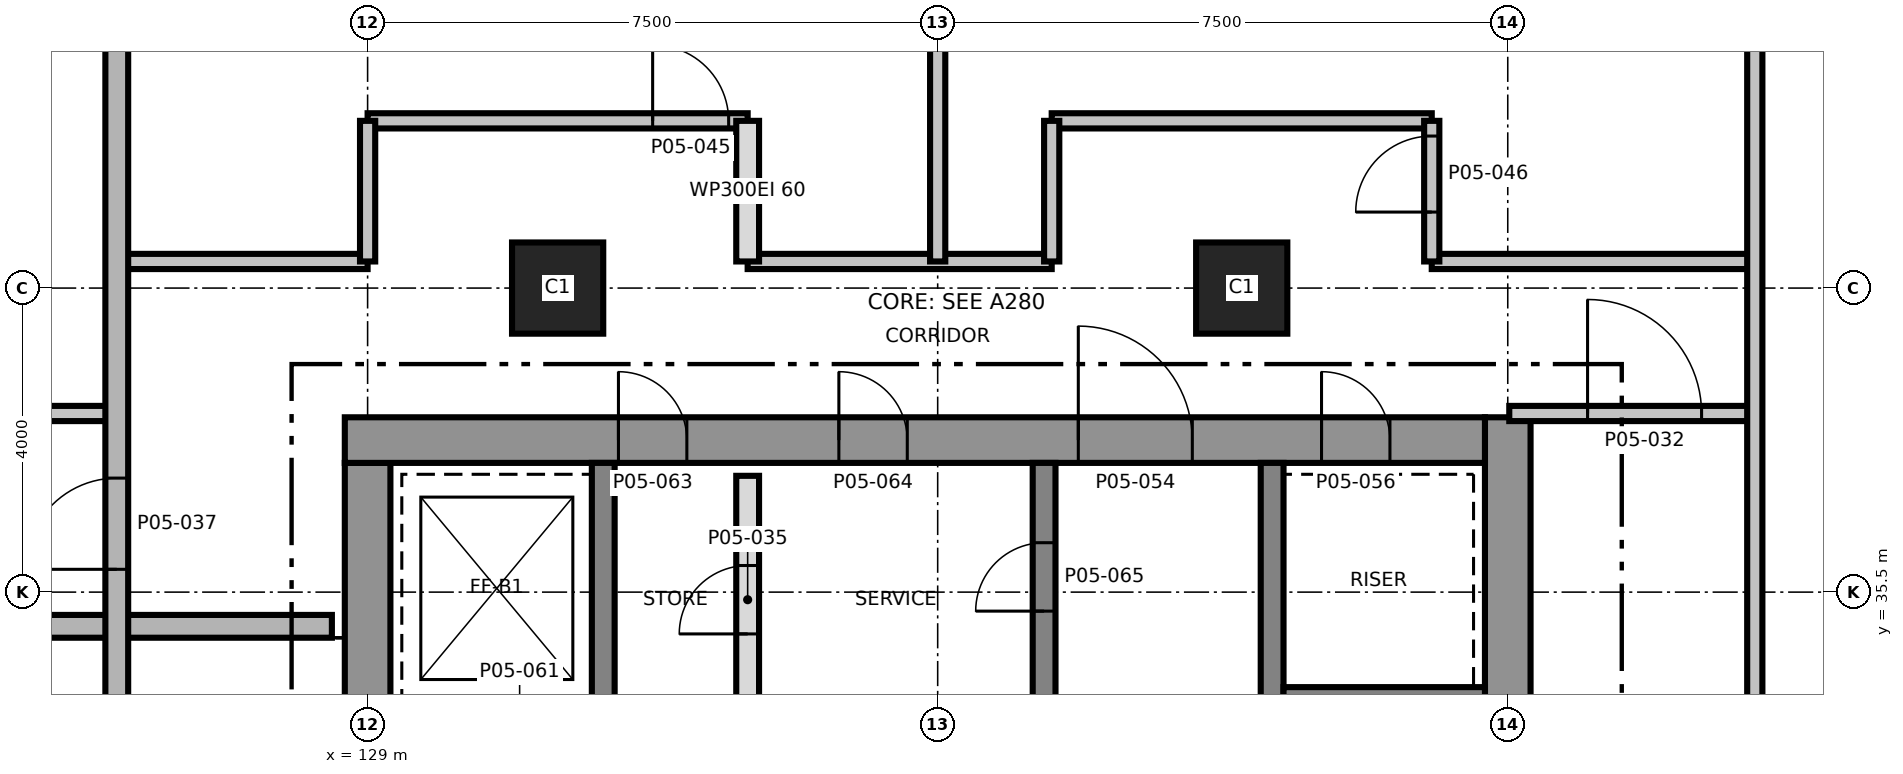
"""IFC4 building model, lengths in metres.
Left out: names, types, materials, properties, quantities, classifications, styles, units other than length and angle.
Written with IfcOpenShell. Run it as: python <this file> out.ifc"""

import sys

from ifc_helpers import new_model, si_unit, direction, frame, frame_2d, origin, origin_2d, place, context, subcontext, project, spatial, rectangle, extrude, element, fill, save


model = new_model("IFC4")
c1 = context("Model", 3, precision=1e-05, world=origin(), true_north=direction((0.0, 1.0)))
c2 = subcontext(c1, "Body", "Model", "MODEL_VIEW")
j1 = project(units=[si_unit("LENGTHUNIT", "METRE"), si_unit("PLANEANGLEUNIT", "RADIAN")], contexts=[c1])
p1 = place(None, origin())
s1 = spatial("IfcSite", under=j1, at=p1, CompositionType="ELEMENT")
p2 = place(p1, origin())
s2 = spatial("IfcBuilding", under=s1, at=p2, CompositionType="ELEMENT")
p3 = place(p2, frame((0.0, 0.0, 28.5)))
s3 = spatial("IfcBuildingStorey", under=s2, at=p3, CompositionType="ELEMENT", Elevation=28.5)
p4 = place(p3, frame((129.0, 24.8, 0.0), z_axis=(0.0, 0.0, 1.0), x_axis=(0.0, 1.0, 0.0)))
e1 = element("IfcWall", 1, at=p4, inside=s3, PredefinedType="SHEAR", context=c2, shape_type="SweptSolid", body=[
    extrude(rectangle(XDim=12.4, YDim=0.6, at=frame_2d((6.2, 0.0))), origin(), (0.0, 0.0, 1.0), 5.0),
])
p5 = place(p4, frame((5.15, 0.0, 0.0)))
e2 = element("IfcOpeningElement", 2, at=p5, cuts=e1, PredefinedType="OPENING", context=c2, shape_type="SweptSolid", body=[
    extrude(rectangle(XDim=1.0, YDim=2.1, at=frame_2d((0.5, 1.05))), frame((0.0, 0.31, 0.0), z_axis=(0.0, -1.0, 0.0), x_axis=(1.0, 0.0, 0.0)), (0.0, 0.0, 1.0), 0.62),
])
p6 = place(p3, frame((144.0, 24.2, 0.0), z_axis=(0.0, 0.0, 1.0), x_axis=(0.0, 1.0, 0.0)))
e3 = element("IfcWall", 3, at=p6, inside=s3, PredefinedType="SHEAR", context=c2, shape_type="SweptSolid", body=[
    extrude(rectangle(XDim=13.6, YDim=0.6, at=frame_2d((6.8, 0.0))), origin(), (0.0, 0.0, 1.0), 5.0),
])
p7 = place(p3, frame((128.7, 37.5, 0.0), z_axis=(0.0, 0.0, 1.0), x_axis=(1.0, 0.0, 0.0)))
e4 = element("IfcWall", 4, at=p7, inside=s3, PredefinedType="SHEAR", context=c2, shape_type="SweptSolid", body=[
    extrude(rectangle(XDim=15.0, YDim=0.6, at=frame_2d((7.5, 0.0))), origin(), (0.0, 0.0, 1.0), 5.0),
])
p8 = place(p7, frame((9.65, 0.0, 0.0)))
e5 = element("IfcOpeningElement", 5, at=p8, cuts=e4, PredefinedType="OPENING", context=c2, shape_type="SweptSolid", body=[
    extrude(rectangle(XDim=1.5, YDim=2.1, at=frame_2d((0.75, 1.05))), frame((0.0, 0.31, 0.0), z_axis=(0.0, -1.0, 0.0), x_axis=(1.0, 0.0, 0.0)), (0.0, 0.0, 1.0), 0.62),
])
p9 = place(p7, frame((12.85, 0.0, 0.0)))
e6 = element("IfcOpeningElement", 6, at=p9, cuts=e4, PredefinedType="OPENING", context=c2, shape_type="SweptSolid", body=[
    extrude(rectangle(XDim=0.9, YDim=2.1, at=frame_2d((0.45, 1.05))), frame((0.0, 0.31, 0.0), z_axis=(0.0, -1.0, 0.0), x_axis=(1.0, 0.0, 0.0)), (0.0, 0.0, 1.0), 0.62),
])
p10 = place(p7, frame((3.6, 0.0, 0.0)))
e7 = element("IfcOpeningElement", 7, at=p10, cuts=e4, PredefinedType="OPENING", context=c2, shape_type="SweptSolid", body=[
    extrude(rectangle(XDim=0.9, YDim=2.1, at=frame_2d((0.45, 1.05))), frame((0.0, 0.31, 0.0), z_axis=(0.0, -1.0, 0.0), x_axis=(1.0, 0.0, 0.0)), (0.0, 0.0, 1.0), 0.62),
])
p11 = place(p7, frame((6.5, 0.0, 0.0)))
e8 = element("IfcOpeningElement", 8, at=p11, cuts=e4, PredefinedType="OPENING", context=c2, shape_type="SweptSolid", body=[
    extrude(rectangle(XDim=0.9, YDim=2.1, at=frame_2d((0.45, 1.05))), frame((0.0, 0.31, 0.0), z_axis=(0.0, -1.0, 0.0), x_axis=(1.0, 0.0, 0.0)), (0.0, 0.0, 1.0), 0.62),
])
p12 = place(p3, frame((132.1, 24.8, 0.0), z_axis=(0.0, 0.0, 1.0), x_axis=(0.0, 1.0, 0.0)))
e9 = element("IfcWall", 9, at=p12, inside=s3, PredefinedType="SHEAR", context=c2, shape_type="SweptSolid", body=[
    extrude(rectangle(XDim=12.4, YDim=0.3, at=frame_2d((6.2, 0.0))), origin(), (0.0, 0.0, 1.0), 5.0),
])
p13 = place(p12, frame((3.9, 0.0, 0.0)))
e10 = element("IfcOpeningElement", 10, at=p13, cuts=e9, PredefinedType="OPENING", context=c2, shape_type="SweptSolid", body=[
    extrude(rectangle(XDim=1.2, YDim=2.1, at=frame_2d((0.6, 1.05))), frame((0.0, 0.16, 0.0), z_axis=(0.0, -1.0, 0.0), x_axis=(1.0, 0.0, 0.0)), (0.0, 0.0, 1.0), 0.32),
])
p14 = place(p3, frame((137.9, 24.8, 0.0), z_axis=(0.0, 0.0, 1.0), x_axis=(0.0, 1.0, 0.0)))
e11 = element("IfcWall", 11, at=p14, inside=s3, PredefinedType="SHEAR", context=c2, shape_type="SweptSolid", body=[
    extrude(rectangle(XDim=12.4, YDim=0.3, at=frame_2d((6.2, 0.0))), origin(), (0.0, 0.0, 1.0), 5.0),
])
p15 = place(p14, frame((3.95, 0.0, 0.0)))
e12 = element("IfcOpeningElement", 12, at=p15, cuts=e11, PredefinedType="OPENING", context=c2, shape_type="SweptSolid", body=[
    extrude(rectangle(XDim=1.5, YDim=2.1, at=frame_2d((0.75, 1.05))), frame((0.0, 0.16, 0.0), z_axis=(0.0, -1.0, 0.0), x_axis=(1.0, 0.0, 0.0)), (0.0, 0.0, 1.0), 0.32),
])
p16 = place(p14, frame((10.45, 0.0, 0.0)))
e13 = element("IfcOpeningElement", 13, at=p16, cuts=e11, PredefinedType="OPENING", context=c2, shape_type="SweptSolid", body=[
    extrude(rectangle(XDim=0.9, YDim=2.1, at=frame_2d((0.45, 1.05))), frame((0.0, 0.16, 0.0), z_axis=(0.0, -1.0, 0.0), x_axis=(1.0, 0.0, 0.0)), (0.0, 0.0, 1.0), 0.32),
])
p17 = place(p3, frame((140.9, 24.8, 0.0), z_axis=(0.0, 0.0, 1.0), x_axis=(0.0, 1.0, 0.0)))
e14 = element("IfcWall", 14, at=p17, inside=s3, PredefinedType="SHEAR", context=c2, shape_type="SweptSolid", body=[
    extrude(rectangle(XDim=12.4, YDim=0.3, at=frame_2d((6.2, 0.0))), origin(), (0.0, 0.0, 1.0), 5.0),
])
p18 = place(p17, frame((5.9, 0.0, 0.0)))
e15 = element("IfcOpeningElement", 15, at=p18, cuts=e14, PredefinedType="OPENING", context=c2, shape_type="SweptSolid", body=[
    extrude(rectangle(XDim=1.2, YDim=2.1, at=frame_2d((0.6, 1.05))), frame((0.0, 0.16, 0.0), z_axis=(0.0, -1.0, 0.0), x_axis=(1.0, 0.0, 0.0)), (0.0, 0.0, 1.0), 0.32),
])
p19 = place(p3, frame((141.05, 34.1, 0.0), z_axis=(0.0, 0.0, 1.0), x_axis=(1.0, 0.0, 0.0)))
e16 = element("IfcWall", 16, at=p19, inside=s3, PredefinedType="SHEAR", context=c2, shape_type="SweptSolid", body=[
    extrude(rectangle(XDim=2.65, YDim=0.3, at=frame_2d((1.325, 0.0))), origin(), (0.0, 0.0, 1.0), 5.0),
])
for number, where, z_axis, x_axis in (
    (17, (131.5, 39.5, 0.0), (0.0, 0.0, 1.0), (1.0, 0.0, 0.0)),
    (18, (140.5, 39.5, 0.0), (0.0, 0.0, 1.0), (1.0, 0.0, 0.0)),
):
    element("IfcColumn", number, at=place(p3, frame(where, z_axis=z_axis, x_axis=x_axis)), inside=s3, PredefinedType="COLUMN", context=c2, shape_type="SweptSolid", body=[
        extrude(rectangle(XDim=1.2, YDim=1.2, at=origin_2d()), origin(), (0.0, 0.0, 1.0), 5.0),
    ])
p20 = place(p3, frame((114.6, 35.05, 0.0), z_axis=(0.0, 0.0, 1.0), x_axis=(1.0, 0.0, 0.0)))
e19 = element("IfcWall", 19, at=p20, inside=s3, PredefinedType="SHEAR", context=c2, shape_type="SweptSolid", body=[
    extrude(rectangle(XDim=13.93, YDim=0.3, at=frame_2d((6.965, 0.0))), origin(), (0.0, 0.0, 1.0), 4.65),
])
p21 = place(p20, frame((5.13, 0.0, 0.0)))
e20 = element("IfcOpeningElement", 20, at=p21, cuts=e19, PredefinedType="OPENING", context=c2, shape_type="SweptSolid", body=[
    extrude(rectangle(XDim=1.0, YDim=2.1, at=frame_2d((0.5, 1.05))), frame((0.0, 0.16, 0.0), z_axis=(0.0, -1.0, 0.0), x_axis=(1.0, 0.0, 0.0)), (0.0, 0.0, 1.0), 0.32),
])
p22 = place(p3, frame((114.6, 37.85, 0.0), z_axis=(0.0, 0.0, 1.0), x_axis=(1.0, 0.0, 0.0)))
e21 = element("IfcWall", 21, at=p22, inside=s3, PredefinedType="PARTITIONING", context=c2, shape_type="SweptSolid", body=[
    extrude(rectangle(XDim=11.15, YDim=0.2, at=frame_2d((5.575, 0.0))), origin(), (0.0, 0.0, 1.0), 3.8),
])
p23 = place(p22, frame((5.005, 0.0, 0.0)))
e22 = element("IfcOpeningElement", 22, at=p23, cuts=e21, PredefinedType="OPENING", context=c2, shape_type="SweptSolid", body=[
    extrude(rectangle(XDim=1.0, YDim=2.1, at=frame_2d((0.5, 1.05))), frame((0.0, 0.11, 0.0), z_axis=(0.0, -1.0, 0.0), x_axis=(1.0, 0.0, 0.0)), (0.0, 0.0, 1.0), 0.22),
])
p24 = place(p3, frame((144.02, 37.85, 0.0), z_axis=(0.0, 0.0, 1.0), x_axis=(1.0, 0.0, 0.0)))
e23 = element("IfcWall", 23, at=p24, inside=s3, PredefinedType="PARTITIONING", context=c2, shape_type="SweptSolid", body=[
    extrude(rectangle(XDim=3.23, YDim=0.2, at=frame_2d((1.615, 0.0))), origin(), (0.0, 0.0, 1.0), 3.8),
])
p25 = place(p24, frame((1.03, 0.0, 0.0)))
e24 = element("IfcOpeningElement", 24, at=p25, cuts=e23, PredefinedType="OPENING", context=c2, shape_type="SweptSolid", body=[
    extrude(rectangle(XDim=1.5, YDim=2.1, at=frame_2d((0.75, 1.05))), frame((0.0, 0.11, 0.0), z_axis=(0.0, -1.0, 0.0), x_axis=(1.0, 0.0, 0.0)), (0.0, 0.0, 1.0), 0.22),
])
p26 = place(p3, frame((125.75, 39.85, 0.0), z_axis=(0.0, 0.0, 1.0), x_axis=(1.0, 0.0, 0.0)))
e25 = element("IfcWall", 25, at=p26, inside=s3, PredefinedType="PARTITIONING", context=c2, shape_type="SweptSolid", body=[
    extrude(rectangle(XDim=3.25, YDim=0.2, at=frame_2d((1.625, 0.0))), origin(), (0.0, 0.0, 1.0), 3.8),
])
p27 = place(p3, frame((134.0, 39.85, 0.0), z_axis=(0.0, 0.0, 1.0), x_axis=(1.0, 0.0, 0.0)))
e26 = element("IfcWall", 26, at=p27, inside=s3, PredefinedType="PARTITIONING", context=c2, shape_type="SweptSolid", body=[
    extrude(rectangle(XDim=4.0, YDim=0.2, at=frame_2d((2.0, 0.0))), origin(), (0.0, 0.0, 1.0), 3.8),
])
p28 = place(p3, frame((143.0, 39.85, 0.0), z_axis=(0.0, 0.0, 1.0), x_axis=(1.0, 0.0, 0.0)))
e27 = element("IfcWall", 27, at=p28, inside=s3, PredefinedType="PARTITIONING", context=c2, shape_type="SweptSolid", body=[
    extrude(rectangle(XDim=4.25, YDim=0.2, at=frame_2d((2.125, 0.0))), origin(), (0.0, 0.0, 1.0), 3.8),
])
p29 = place(p3, frame((129.0, 41.7, 0.0), z_axis=(0.0, 0.0, 1.0), x_axis=(1.0, 0.0, 0.0)))
e28 = element("IfcWall", 28, at=p29, inside=s3, PredefinedType="PARTITIONING", context=c2, shape_type="SweptSolid", body=[
    extrude(rectangle(XDim=5.0, YDim=0.2, at=frame_2d((2.5, 0.0))), origin(), (0.0, 0.0, 1.0), 3.8),
])
p30 = place(p29, frame((3.75, 0.0, 0.0)))
e29 = element("IfcOpeningElement", 29, at=p30, cuts=e28, PredefinedType="OPENING", context=c2, shape_type="SweptSolid", body=[
    extrude(rectangle(XDim=1.0, YDim=2.1, at=frame_2d((0.5, 1.05))), frame((0.0, 0.11, 0.0), z_axis=(0.0, -1.0, 0.0), x_axis=(1.0, 0.0, 0.0)), (0.0, 0.0, 1.0), 0.22),
])
p31 = place(p3, frame((138.0, 41.7, 0.0), z_axis=(0.0, 0.0, 1.0), x_axis=(1.0, 0.0, 0.0)))
e30 = element("IfcWall", 30, at=p31, inside=s3, PredefinedType="PARTITIONING", context=c2, shape_type="SweptSolid", body=[
    extrude(rectangle(XDim=5.0, YDim=0.2, at=frame_2d((2.5, 0.0))), origin(), (0.0, 0.0, 1.0), 3.8),
])
p32 = place(p3, frame((125.7, 11.07, 0.0), z_axis=(0.0, 0.0, 1.0), x_axis=(0.0, 1.0, 0.0)))
e31 = element("IfcWall", 31, at=p32, inside=s3, PredefinedType="SHEAR", context=c2, shape_type="SweptSolid", body=[
    extrude(rectangle(XDim=38.86, YDim=0.3, at=frame_2d((19.43, 0.0))), origin(), (0.0, 0.0, 1.0), 4.65),
])
p33 = place(p32, frame((24.73, 0.0, 0.0)))
e32 = element("IfcOpeningElement", 32, at=p33, cuts=e31, PredefinedType="OPENING", context=c2, shape_type="SweptSolid", body=[
    extrude(rectangle(XDim=1.2, YDim=2.1, at=frame_2d((0.6, 1.05))), frame((0.0, 0.16, 0.0), z_axis=(0.0, -1.0, 0.0), x_axis=(1.0, 0.0, 0.0)), (0.0, 0.0, 1.0), 0.32),
])
p34 = place(p3, frame((129.0, 39.85, 0.0), z_axis=(0.0, 0.0, 1.0), x_axis=(0.0, 1.0, 0.0)))
e33 = element("IfcWall", 33, at=p34, inside=s3, PredefinedType="PARTITIONING", context=c2, shape_type="SweptSolid", body=[
    extrude(rectangle(XDim=1.85, YDim=0.2, at=frame_2d((0.925, 0.0))), origin(), (0.0, 0.0, 1.0), 3.8),
])
p35 = place(p3, frame((134.0, 33.77, 0.0), z_axis=(0.0, 0.0, 1.0), x_axis=(0.0, 1.0, 0.0)))
e34 = element("IfcWall", 34, at=p35, inside=s3, PredefinedType="PARTITIONING", context=c2, shape_type="SweptSolid", body=[
    extrude(rectangle(XDim=3.26, YDim=0.3, at=frame_2d((1.63, 0.0))), origin(), (0.0, 0.0, 1.0), 3.8),
])
p36 = place(p35, frame((1.18, 0.0, 0.0)))
e35 = element("IfcOpeningElement", 35, at=p36, cuts=e34, PredefinedType="OPENING", context=c2, shape_type="SweptSolid", body=[
    extrude(rectangle(XDim=0.9, YDim=2.1, at=frame_2d((0.45, 1.05))), frame((0.0, 0.16, 0.0), z_axis=(0.0, -1.0, 0.0), x_axis=(1.0, 0.0, 0.0)), (0.0, 0.0, 1.0), 0.32),
])
p37 = place(p3, frame((134.0, 39.85, 0.0), z_axis=(0.0, 0.0, 1.0), x_axis=(0.0, 1.0, 0.0)))
e36 = element("IfcWall", 36, at=p37, inside=s3, PredefinedType="PARTITIONING", context=c2, shape_type="SweptSolid", body=[
    extrude(rectangle(XDim=1.85, YDim=0.3, at=frame_2d((0.925, 0.0))), origin(), (0.0, 0.0, 1.0), 3.8),
])
p38 = place(p3, frame((136.5, 39.85, 0.0), z_axis=(0.0, 0.0, 1.0), x_axis=(0.0, 1.0, 0.0)))
e37 = element("IfcWall", 37, at=p38, inside=s3, PredefinedType="PARTITIONING", context=c2, shape_type="SweptSolid", body=[
    extrude(rectangle(XDim=10.08, YDim=0.2, at=frame_2d((5.04, 0.0))), origin(), (0.0, 0.0, 1.0), 3.8),
])
p39 = place(p3, frame((138.0, 39.85, 0.0), z_axis=(0.0, 0.0, 1.0), x_axis=(0.0, 1.0, 0.0)))
e38 = element("IfcWall", 38, at=p39, inside=s3, PredefinedType="PARTITIONING", context=c2, shape_type="SweptSolid", body=[
    extrude(rectangle(XDim=1.85, YDim=0.2, at=frame_2d((0.925, 0.0))), origin(), (0.0, 0.0, 1.0), 3.8),
])
p40 = place(p3, frame((143.0, 39.85, 0.0), z_axis=(0.0, 0.0, 1.0), x_axis=(0.0, 1.0, 0.0)))
e39 = element("IfcWall", 39, at=p40, inside=s3, PredefinedType="PARTITIONING", context=c2, shape_type="SweptSolid", body=[
    extrude(rectangle(XDim=1.85, YDim=0.2, at=frame_2d((0.925, 0.0))), origin(), (0.0, 0.0, 1.0), 3.8),
])
p41 = place(p40, frame((0.65, 0.0, 0.0)))
e40 = element("IfcOpeningElement", 40, at=p41, cuts=e39, PredefinedType="OPENING", context=c2, shape_type="SweptSolid", body=[
    extrude(rectangle(XDim=1.0, YDim=2.1, at=frame_2d((0.5, 1.05))), frame((0.0, 0.11, 0.0), z_axis=(0.0, -1.0, 0.0), x_axis=(1.0, 0.0, 0.0)), (0.0, 0.0, 1.0), 0.22),
])
p42 = place(p3, frame((147.25, 11.07, 0.0), z_axis=(0.0, 0.0, 1.0), x_axis=(0.0, 1.0, 0.0)))
e41 = element("IfcWall", 41, at=p42, inside=s3, PredefinedType="PARTITIONING", context=c2, shape_type="SweptSolid", body=[
    extrude(rectangle(XDim=38.86, YDim=0.2, at=frame_2d((19.43, 0.0))), origin(), (0.0, 0.0, 1.0), 3.8),
])
p43 = place(p42, frame((18.18, 0.0, 0.0)))
e42 = element("IfcOpeningElement", 42, at=p43, cuts=e41, PredefinedType="OPENING", context=c2, shape_type="SweptSolid", body=[
    extrude(rectangle(XDim=1.5, YDim=2.1, at=frame_2d((0.75, 1.05))), frame((0.0, 0.11, 0.0), z_axis=(0.0, -1.0, 0.0), x_axis=(1.0, 0.0, 0.0)), (0.0, 0.0, 1.0), 0.22),
])
p44 = place(p42, frame((4.975, 0.0, 0.0)))
e43 = element("IfcOpeningElement", 43, at=p44, cuts=e41, PredefinedType="OPENING", context=c2, shape_type="SweptSolid", body=[
    extrude(rectangle(XDim=1.0, YDim=2.1, at=frame_2d((0.5, 1.05))), frame((0.0, 0.11, 0.0), z_axis=(0.0, -1.0, 0.0), x_axis=(1.0, 0.0, 0.0)), (0.0, 0.0, 1.0), 0.22),
])
p45 = place(p25, origin())
e44 = element("IfcDoor", 44, at=p45, inside=s3, OperationType="SINGLE_SWING_RIGHT", PredefinedType="DOOR", context=c2, shape_type="SweptSolid", body=[
    extrude(rectangle(XDim=1.5, YDim=2.1, at=frame_2d((0.75, 1.05))), frame((0.0, 0.025, 0.0), z_axis=(0.0, -1.0, 0.0), x_axis=(1.0, 0.0, 0.0)), (0.0, 0.0, 1.0), 0.05),
])
fill(e24, e44)
p46 = place(p36, origin())
e45 = element("IfcDoor", 45, at=p46, inside=s3, OperationType="SINGLE_SWING_LEFT", PredefinedType="DOOR", context=c2, shape_type="SweptSolid", body=[
    extrude(rectangle(XDim=0.9, YDim=2.1, at=frame_2d((0.45, 1.05))), frame((0.0, 0.025, 0.0), z_axis=(0.0, -1.0, 0.0), x_axis=(1.0, 0.0, 0.0)), (0.0, 0.0, 1.0), 0.05),
])
fill(e35, e45)
p47 = place(p33, origin())
e46 = element("IfcDoor", 46, at=p47, inside=s3, OperationType="SINGLE_SWING_LEFT", PredefinedType="DOOR", context=c2, shape_type="SweptSolid", body=[
    extrude(rectangle(XDim=1.2, YDim=2.1, at=frame_2d((0.6, 1.05))), frame((0.0, 0.025, 0.0), z_axis=(0.0, -1.0, 0.0), x_axis=(1.0, 0.0, 0.0)), (0.0, 0.0, 1.0), 0.05),
])
fill(e32, e46)
p48 = place(p30, origin())
e47 = element("IfcDoor", 47, at=p48, inside=s3, OperationType="SINGLE_SWING_LEFT", PredefinedType="DOOR", context=c2, shape_type="SweptSolid", body=[
    extrude(rectangle(XDim=1.0, YDim=2.1, at=frame_2d((0.5, 1.05))), frame((0.0, 0.025, 0.0), z_axis=(0.0, -1.0, 0.0), x_axis=(1.0, 0.0, 0.0)), (0.0, 0.0, 1.0), 0.05),
])
fill(e29, e47)
p49 = place(p41, origin())
e48 = element("IfcDoor", 48, at=p49, inside=s3, OperationType="SINGLE_SWING_RIGHT", PredefinedType="DOOR", context=c2, shape_type="SweptSolid", body=[
    extrude(rectangle(XDim=1.0, YDim=2.1, at=frame_2d((0.5, 1.05))), frame((0.0, 0.025, 0.0), z_axis=(0.0, -1.0, 0.0), x_axis=(1.0, 0.0, 0.0)), (0.0, 0.0, 1.0), 0.05),
])
fill(e40, e48)
p50 = place(p8, origin())
e49 = element("IfcDoor", 49, at=p50, inside=s3, OperationType="SINGLE_SWING_RIGHT", PredefinedType="DOOR", context=c2, shape_type="SweptSolid", body=[
    extrude(rectangle(XDim=1.5, YDim=2.1, at=frame_2d((0.75, 1.05))), frame((0.0, 0.025, 0.0), z_axis=(0.0, -1.0, 0.0), x_axis=(1.0, 0.0, 0.0)), (0.0, 0.0, 1.0), 0.05),
])
fill(e5, e49)
p51 = place(p9, origin())
e50 = element("IfcDoor", 50, at=p51, inside=s3, OperationType="SINGLE_SWING_RIGHT", PredefinedType="DOOR", context=c2, shape_type="SweptSolid", body=[
    extrude(rectangle(XDim=0.9, YDim=2.1, at=frame_2d((0.45, 1.05))), frame((0.0, 0.025, 0.0), z_axis=(0.0, -1.0, 0.0), x_axis=(1.0, 0.0, 0.0)), (0.0, 0.0, 1.0), 0.05),
])
fill(e6, e50)
p52 = place(p10, origin())
e51 = element("IfcDoor", 51, at=p52, inside=s3, OperationType="SINGLE_SWING_LEFT", PredefinedType="DOOR", context=c2, shape_type="SweptSolid", body=[
    extrude(rectangle(XDim=0.9, YDim=2.1, at=frame_2d((0.45, 1.05))), frame((0.0, 0.025, 0.0), z_axis=(0.0, -1.0, 0.0), x_axis=(1.0, 0.0, 0.0)), (0.0, 0.0, 1.0), 0.05),
])
fill(e7, e51)
p53 = place(p11, origin())
e52 = element("IfcDoor", 52, at=p53, inside=s3, OperationType="SINGLE_SWING_RIGHT", PredefinedType="DOOR", context=c2, shape_type="SweptSolid", body=[
    extrude(rectangle(XDim=0.9, YDim=2.1, at=frame_2d((0.45, 1.05))), frame((0.0, 0.025, 0.0), z_axis=(0.0, -1.0, 0.0), x_axis=(1.0, 0.0, 0.0)), (0.0, 0.0, 1.0), 0.05),
])
fill(e8, e52)
p54 = place(p16, origin())
e53 = element("IfcDoor", 53, at=p54, inside=s3, OperationType="SINGLE_SWING_RIGHT", PredefinedType="DOOR", context=c2, shape_type="SweptSolid", body=[
    extrude(rectangle(XDim=0.9, YDim=2.1, at=frame_2d((0.45, 1.05))), frame((0.0, 0.025, 0.0), z_axis=(0.0, -1.0, 0.0), x_axis=(1.0, 0.0, 0.0)), (0.0, 0.0, 1.0), 0.05),
])
fill(e13, e53)
save(model, sys.argv[1])
